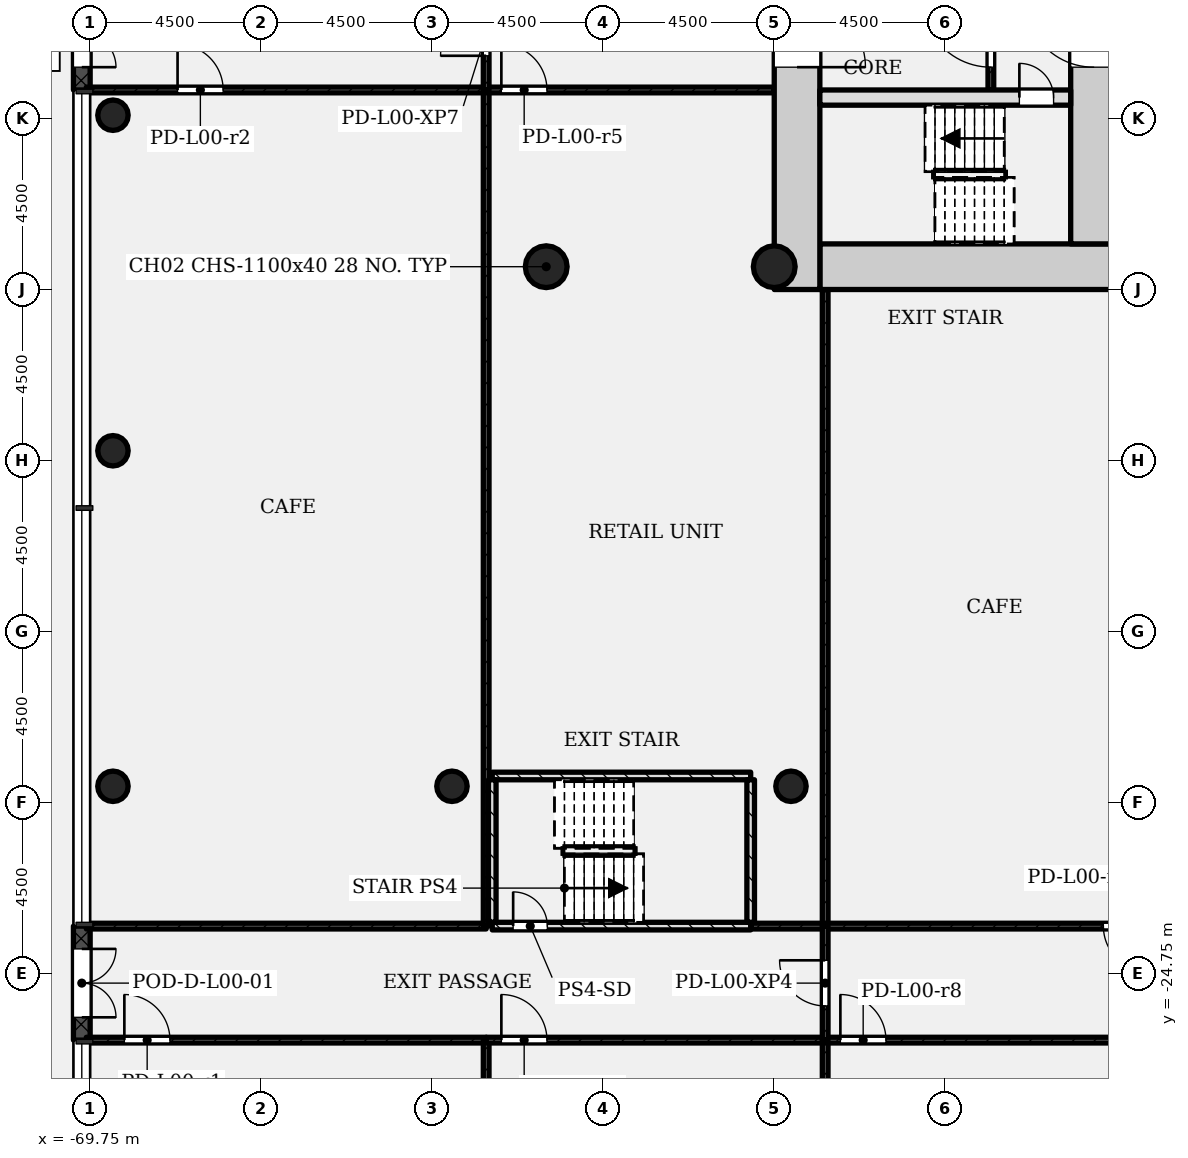
"""IFC4 building model, lengths in metres.
Left out: names, types, materials, properties, quantities, classifications, styles, units other than length and angle.
Written with IfcOpenShell. Run it as: python <this file> out.ifc"""

import sys

from ifc_helpers import new_model, si_unit, direction, frame, frame_2d, origin, origin_2d, place, context, subcontext, project, spatial, rectangle, hollow_circle, extrude, element, fill, save


model = new_model("IFC4")
c1 = context("Model", 3, precision=1e-05, world=origin(), true_north=direction((0.0, 1.0)))
c2 = subcontext(c1, "Body", "Model", "MODEL_VIEW")
j1 = project(units=[si_unit("LENGTHUNIT", "METRE"), si_unit("PLANEANGLEUNIT", "RADIAN")], contexts=[c1])
p1 = place(None, origin())
s1 = spatial("IfcSite", under=j1, at=p1, CompositionType="ELEMENT")
p2 = place(p1, origin())
s2 = spatial("IfcBuilding", under=s1, at=p2, CompositionType="ELEMENT")
p3 = place(p2, origin())
s3 = spatial("IfcBuildingStorey", under=s2, at=p3, CompositionType="ELEMENT", Elevation=0.0)
p4 = place(p3, frame((-50.55, -6.15, -0.4), z_axis=(0.0, 0.0, 1.0), x_axis=(1.0, 0.0, 0.0)))
e1 = element("IfcWall", 1, at=p4, inside=s3, PredefinedType="SHEAR", context=c2, shape_type="SweptSolid", body=[
    extrude(rectangle(XDim=7.8, YDim=1.2, at=frame_2d((3.9, 0.0))), origin(), (0.0, 0.0, 1.0), 6.4),
])
p5 = place(p3, frame((-43.35, -5.55, -0.4), z_axis=(0.0, 0.0, 1.0), x_axis=(0.0, 1.0, 0.0)))
e2 = element("IfcWall", 2, at=p5, inside=s3, PredefinedType="SHEAR", context=c2, shape_type="SweptSolid", body=[
    extrude(rectangle(XDim=12.3, YDim=1.2, at=frame_2d((6.15, 0.0))), origin(), (0.0, 0.0, 1.0), 6.4),
])
p6 = place(p5, frame((4.65, 0.0, 0.4)))
e3 = element("IfcOpeningElement", 3, at=p6, cuts=e2, PredefinedType="OPENING", context=c2, shape_type="SweptSolid", body=[
    extrude(rectangle(XDim=1.8, YDim=2.1, at=frame_2d((0.9, 1.05))), frame((0.0, 0.61, 0.0), z_axis=(0.0, -1.0, 0.0), x_axis=(1.0, 0.0, 0.0)), (0.0, 0.0, 1.0), 1.22),
])
p7 = place(p3, frame((-51.15, 5.55, -0.4), z_axis=(0.0, 0.0, 1.0), x_axis=(0.0, -1.0, 0.0)))
e4 = element("IfcWall", 4, at=p7, inside=s3, PredefinedType="SHEAR", context=c2, shape_type="SweptSolid", body=[
    extrude(rectangle(XDim=12.3, YDim=1.2, at=frame_2d((6.15, 0.0))), origin(), (0.0, 0.0, 1.0), 6.4),
])
p8 = place(p7, frame((4.65, 0.0, 0.4)))
e5 = element("IfcOpeningElement", 5, at=p8, cuts=e4, PredefinedType="OPENING", context=c2, shape_type="SweptSolid", body=[
    extrude(rectangle(XDim=1.8, YDim=2.1, at=frame_2d((0.9, 1.05))), frame((0.0, 0.61, 0.0), z_axis=(0.0, -1.0, 0.0), x_axis=(1.0, 0.0, 0.0)), (0.0, 0.0, 1.0), 1.22),
])
p9 = place(p3, frame((-50.55, -1.7, -0.4), z_axis=(0.0, 0.0, 1.0), x_axis=(1.0, 0.0, 0.0)))
e6 = element("IfcWall", 6, at=p9, inside=s3, PredefinedType="SHEAR", context=c2, shape_type="SweptSolid", body=[
    extrude(rectangle(XDim=6.6, YDim=0.4, at=frame_2d((3.3, 0.0))), origin(), (0.0, 0.0, 1.0), 6.4),
])
p10 = place(p9, frame((5.25, 0.0, 0.4)))
e7 = element("IfcOpeningElement", 7, at=p10, cuts=e6, PredefinedType="OPENING", context=c2, shape_type="SweptSolid", body=[
    extrude(rectangle(XDim=0.9, YDim=2.1, at=frame_2d((0.45, 1.05))), frame((0.0, 0.21, 0.0), z_axis=(0.0, -1.0, 0.0), x_axis=(1.0, 0.0, 0.0)), (0.0, 0.0, 1.0), 0.42),
])
for number, where, z_axis, x_axis in (
    (8, (-51.75, -6.15, -0.4), (0.0, 0.0, 1.0), (1.0, 0.0, 0.0)),
    (9, (-57.75, -6.15, -0.4), (0.0, 0.0, 1.0), (1.0, 0.0, 0.0)),
):
    element("IfcColumn", number, at=place(p3, frame(where, z_axis=z_axis, x_axis=x_axis)), inside=s3, PredefinedType="COLUMN", context=c2, shape_type="SweptSolid", body=[
        extrude(hollow_circle(Radius=0.55, WallThickness=0.04, at=origin_2d()), origin(), (0.0, 0.0, 1.0), 6.4),
    ])
for number, where, z_axis, x_axis in (
    (10, (-69.15, -19.821, -0.4), (0.0, 0.0, 1.0), (1.0, 0.0, 0.0)),
    (11, (-60.23, -19.821, -0.4), (0.0, 0.0, 1.0), (1.0, 0.0, 0.0)),
    (12, (-51.31, -19.821, -0.4), (0.0, 0.0, 1.0), (1.0, 0.0, 0.0)),
    (13, (-69.15, -10.993, -0.4), (0.0, 0.0, 1.0), (1.0, 0.0, 0.0)),
    (14, (-69.15, -2.164, -0.4), (0.0, 0.0, 1.0), (1.0, 0.0, 0.0)),
):
    element("IfcColumn", number, at=place(p3, frame(where, z_axis=z_axis, x_axis=x_axis)), inside=s3, PredefinedType="COLUMN", context=c2, shape_type="SweptSolid", body=[
        extrude(hollow_circle(Radius=0.4, WallThickness=0.028, at=origin_2d()), origin(), (0.0, 0.0, 1.0), 6.4),
    ])
p11 = place(p3, frame((-69.97, 1.5, 0.0), z_axis=(0.0, 0.0, 1.0), x_axis=(0.0, -1.0, 0.0)))
e15 = element("IfcWall", 15, at=p11, inside=s3, PredefinedType="STANDARD", context=c2, shape_type="SweptSolid", body=[
    extrude(rectangle(XDim=3.0, YDim=0.44, at=frame_2d((1.5, 0.0))), origin(), (0.0, 0.0, 1.0), 5.7),
])
p12 = place(p11, frame((0.6, 0.0, 0.0)))
e16 = element("IfcOpeningElement", 16, at=p12, cuts=e15, PredefinedType="OPENING", context=c2, shape_type="SweptSolid", body=[
    extrude(rectangle(XDim=1.8, YDim=2.1, at=frame_2d((0.9, 1.05))), frame((0.0, 0.23, 0.0), z_axis=(0.0, -1.0, 0.0), x_axis=(1.0, 0.0, 0.0)), (0.0, 0.0, 1.0), 0.46),
])
p13 = place(p3, frame((-69.97, -23.5, 0.0), z_axis=(0.0, 0.0, 1.0), x_axis=(0.0, -1.0, 0.0)))
e17 = element("IfcWall", 17, at=p13, inside=s3, PredefinedType="STANDARD", context=c2, shape_type="SweptSolid", body=[
    extrude(rectangle(XDim=3.0, YDim=0.44, at=frame_2d((1.5, 0.0))), origin(), (0.0, 0.0, 1.0), 5.7),
])
p14 = place(p13, frame((0.6, 0.0, 0.0)))
e18 = element("IfcOpeningElement", 18, at=p14, cuts=e17, PredefinedType="OPENING", context=c2, shape_type="SweptSolid", body=[
    extrude(rectangle(XDim=1.8, YDim=2.1, at=frame_2d((0.9, 1.05))), frame((0.0, 0.23, 0.0), z_axis=(0.0, -1.0, 0.0), x_axis=(1.0, 0.0, 0.0)), (0.0, 0.0, 1.0), 0.46),
])
p15 = place(p3, frame((-46.05, 1.5, 0.0), z_axis=(0.0, 0.0, 1.0), x_axis=(0.0, -1.0, 0.0)))
e19 = element("IfcWall", 19, at=p15, inside=s3, PredefinedType="PARTITIONING", context=c2, shape_type="SweptSolid", body=[
    extrude(rectangle(XDim=3.0, YDim=0.15, at=frame_2d((1.5, 0.0))), origin(), (0.0, 0.0, 1.0), 5.58),
])
p16 = place(p15, frame((0.6, 0.0, 0.0)))
e20 = element("IfcOpeningElement", 20, at=p16, cuts=e19, PredefinedType="OPENING", context=c2, shape_type="SweptSolid", body=[
    extrude(rectangle(XDim=1.8, YDim=2.1, at=frame_2d((0.9, 1.05))), frame((0.0, 0.085, 0.0), z_axis=(0.0, -1.0, 0.0), x_axis=(1.0, 0.0, 0.0)), (0.0, 0.0, 1.0), 0.17),
])
p17 = place(p3, frame((-69.85, -26.5, 0.0), z_axis=(0.0, 0.0, 1.0), x_axis=(1.0, 0.0, 0.0)))
e21 = element("IfcWall", 21, at=p17, inside=s3, PredefinedType="PARTITIONING", context=c2, shape_type="SweptSolid", body=[
    extrude(rectangle(XDim=10.52, YDim=0.15, at=frame_2d((5.26, 0.0))), origin(), (0.0, 0.0, 1.0), 5.58),
])
p18 = place(p17, frame((1.0, 0.0, 0.0)))
e22 = element("IfcOpeningElement", 22, at=p18, cuts=e21, PredefinedType="OPENING", context=c2, shape_type="SweptSolid", body=[
    extrude(rectangle(XDim=1.2, YDim=2.1, at=frame_2d((0.6, 1.05))), frame((0.0, 0.085, 0.0), z_axis=(0.0, -1.0, 0.0), x_axis=(1.0, 0.0, 0.0)), (0.0, 0.0, 1.0), 0.17),
])
p19 = place(p3, frame((-59.33, -26.5, 0.0), z_axis=(0.0, 0.0, 1.0), x_axis=(0.0, -1.0, 0.0)))
e23 = element("IfcWall", 23, at=p19, inside=s3, PredefinedType="PARTITIONING", context=c2, shape_type="SweptSolid", body=[
    extrude(rectangle(XDim=16.35, YDim=0.15, at=frame_2d((8.175, 0.0))), origin(), (0.0, 0.0, 1.0), 5.58),
])
p20 = place(p3, frame((-69.85, -1.5, 0.0), z_axis=(0.0, 0.0, 1.0), x_axis=(1.0, 0.0, 0.0)))
e24 = element("IfcWall", 24, at=p20, inside=s3, PredefinedType="PARTITIONING", context=c2, shape_type="SweptSolid", body=[
    extrude(rectangle(XDim=10.52, YDim=0.15, at=frame_2d((5.26, 0.0))), origin(), (0.0, 0.0, 1.0), 5.58),
])
p21 = place(p20, frame((2.4, 0.0, 0.0)))
e25 = element("IfcOpeningElement", 25, at=p21, cuts=e24, PredefinedType="OPENING", context=c2, shape_type="SweptSolid", body=[
    extrude(rectangle(XDim=1.2, YDim=2.1, at=frame_2d((0.6, 1.05))), frame((0.0, 0.085, 0.0), z_axis=(0.0, -1.0, 0.0), x_axis=(1.0, 0.0, 0.0)), (0.0, 0.0, 1.0), 0.17),
])
p22 = place(p3, frame((-59.33, -23.5, 0.0), z_axis=(0.0, 0.0, 1.0), x_axis=(-1.0, 0.0, 0.0)))
e26 = element("IfcWall", 26, at=p22, inside=s3, PredefinedType="PARTITIONING", context=c2, shape_type="SweptSolid", body=[
    extrude(rectangle(XDim=10.52, YDim=0.15, at=frame_2d((5.26, 0.0))), origin(), (0.0, 0.0, 1.0), 5.58),
])
p23 = place(p3, frame((-59.33, -1.5, 0.0), z_axis=(0.0, 0.0, 1.0), x_axis=(0.0, -1.0, 0.0)))
e27 = element("IfcWall", 27, at=p23, inside=s3, PredefinedType="PARTITIONING", context=c2, shape_type="SweptSolid", body=[
    extrude(rectangle(XDim=22.0, YDim=0.15, at=frame_2d((11.0, 0.0))), origin(), (0.0, 0.0, 1.0), 5.58),
])
p24 = place(p3, frame((-59.33, -26.5, 0.0), z_axis=(0.0, 0.0, 1.0), x_axis=(1.0, 0.0, 0.0)))
e28 = element("IfcWall", 28, at=p24, inside=s3, PredefinedType="PARTITIONING", context=c2, shape_type="SweptSolid", body=[
    extrude(rectangle(XDim=8.92, YDim=0.15, at=frame_2d((4.46, 0.0))), origin(), (0.0, 0.0, 1.0), 5.58),
])
p25 = place(p24, frame((0.4, 0.0, 0.0)))
e29 = element("IfcOpeningElement", 29, at=p25, cuts=e28, PredefinedType="OPENING", context=c2, shape_type="SweptSolid", body=[
    extrude(rectangle(XDim=1.2, YDim=2.1, at=frame_2d((0.6, 1.05))), frame((0.0, 0.085, 0.0), z_axis=(0.0, -1.0, 0.0), x_axis=(1.0, 0.0, 0.0)), (0.0, 0.0, 1.0), 0.17),
])
p26 = place(p3, frame((-50.41, -26.5, 0.0), z_axis=(0.0, 0.0, 1.0), x_axis=(0.0, -1.0, 0.0)))
e30 = element("IfcWall", 30, at=p26, inside=s3, PredefinedType="PARTITIONING", context=c2, shape_type="SweptSolid", body=[
    extrude(rectangle(XDim=16.35, YDim=0.15, at=frame_2d((8.175, 0.0))), origin(), (0.0, 0.0, 1.0), 5.58),
])
p27 = place(p3, frame((-59.33, -1.5, 0.0), z_axis=(0.0, 0.0, 1.0), x_axis=(1.0, 0.0, 0.0)))
e31 = element("IfcWall", 31, at=p27, inside=s3, PredefinedType="PARTITIONING", context=c2, shape_type="SweptSolid", body=[
    extrude(rectangle(XDim=7.58, YDim=0.15, at=frame_2d((3.79, 0.0))), origin(), (0.0, 0.0, 1.0), 5.58),
])
p28 = place(p27, frame((0.4, 0.0, 0.0)))
e32 = element("IfcOpeningElement", 32, at=p28, cuts=e31, PredefinedType="OPENING", context=c2, shape_type="SweptSolid", body=[
    extrude(rectangle(XDim=1.2, YDim=2.1, at=frame_2d((0.6, 1.05))), frame((0.0, 0.085, 0.0), z_axis=(0.0, -1.0, 0.0), x_axis=(1.0, 0.0, 0.0)), (0.0, 0.0, 1.0), 0.17),
])
p29 = place(p3, frame((-50.41, -23.5, 0.0), z_axis=(0.0, 0.0, 1.0), x_axis=(-1.0, 0.0, 0.0)))
e33 = element("IfcWall", 33, at=p29, inside=s3, PredefinedType="PARTITIONING", context=c2, shape_type="SweptSolid", body=[
    extrude(rectangle(XDim=1.96, YDim=0.15, at=frame_2d((0.98, 0.0))), origin(), (0.0, 0.0, 1.0), 5.58),
])
p30 = place(p3, frame((-50.41, -6.75, 0.0), z_axis=(0.0, 0.0, 1.0), x_axis=(0.0, -1.0, 0.0)))
e34 = element("IfcWall", 34, at=p30, inside=s3, PredefinedType="PARTITIONING", context=c2, shape_type="SweptSolid", body=[
    extrude(rectangle(XDim=16.75, YDim=0.15, at=frame_2d((8.375, 0.0))), origin(), (0.0, 0.0, 1.0), 5.58),
])
p31 = place(p3, frame((-50.41, -26.5, 0.0), z_axis=(0.0, 0.0, 1.0), x_axis=(1.0, 0.0, 0.0)))
e35 = element("IfcWall", 35, at=p31, inside=s3, PredefinedType="PARTITIONING", context=c2, shape_type="SweptSolid", body=[
    extrude(rectangle(XDim=8.92, YDim=0.15, at=frame_2d((4.46, 0.0))), origin(), (0.0, 0.0, 1.0), 5.58),
])
p32 = place(p31, frame((0.4, 0.0, 0.0)))
e36 = element("IfcOpeningElement", 36, at=p32, cuts=e35, PredefinedType="OPENING", context=c2, shape_type="SweptSolid", body=[
    extrude(rectangle(XDim=1.2, YDim=2.1, at=frame_2d((0.6, 1.05))), frame((0.0, 0.085, 0.0), z_axis=(0.0, -1.0, 0.0), x_axis=(1.0, 0.0, 0.0)), (0.0, 0.0, 1.0), 0.17),
])
p33 = place(p3, frame((-41.49, -23.5, 0.0), z_axis=(0.0, 0.0, 1.0), x_axis=(-1.0, 0.0, 0.0)))
e37 = element("IfcWall", 37, at=p33, inside=s3, PredefinedType="PARTITIONING", context=c2, shape_type="SweptSolid", body=[
    extrude(rectangle(XDim=8.92, YDim=0.15, at=frame_2d((4.46, 0.0))), origin(), (0.0, 0.0, 1.0), 5.58),
])
p34 = place(p33, frame((0.4, 0.0, 0.0)))
e38 = element("IfcOpeningElement", 38, at=p34, cuts=e37, PredefinedType="OPENING", context=c2, shape_type="SweptSolid", body=[
    extrude(rectangle(XDim=1.2, YDim=2.1, at=frame_2d((0.6, 1.05))), frame((0.0, 0.085, 0.0), z_axis=(0.0, -1.0, 0.0), x_axis=(1.0, 0.0, 0.0)), (0.0, 0.0, 1.0), 0.17),
])
p35 = place(p3, frame((-50.41, -26.5, 0.0), z_axis=(0.0, 0.0, 1.0), x_axis=(0.0, 1.0, 0.0)))
e39 = element("IfcWall", 39, at=p35, inside=s3, PredefinedType="PARTITIONING", context=c2, shape_type="SweptSolid", body=[
    extrude(rectangle(XDim=3.0, YDim=0.15, at=frame_2d((1.5, 0.0))), origin(), (0.0, 0.0, 1.0), 5.58),
])
p36 = place(p35, frame((0.9, 0.0, 0.0)))
e40 = element("IfcOpeningElement", 40, at=p36, cuts=e39, PredefinedType="OPENING", context=c2, shape_type="SweptSolid", body=[
    extrude(rectangle(XDim=1.2, YDim=2.1, at=frame_2d((0.6, 1.05))), frame((0.0, 0.085, 0.0), z_axis=(0.0, -1.0, 0.0), x_axis=(1.0, 0.0, 0.0)), (0.0, 0.0, 1.0), 0.17),
])
p37 = place(p3, frame((-59.33, -1.5, 0.0), z_axis=(0.0, 0.0, 1.0), x_axis=(0.0, 1.0, 0.0)))
e41 = element("IfcWall", 41, at=p37, inside=s3, PredefinedType="PARTITIONING", context=c2, shape_type="SweptSolid", body=[
    extrude(rectangle(XDim=3.0, YDim=0.15, at=frame_2d((1.5, 0.0))), origin(), (0.0, 0.0, 1.0), 5.58),
])
p38 = place(p37, frame((0.9, 0.0, 0.0)))
e42 = element("IfcOpeningElement", 42, at=p38, cuts=e41, PredefinedType="OPENING", context=c2, shape_type="SweptSolid", body=[
    extrude(rectangle(XDim=1.2, YDim=2.1, at=frame_2d((0.6, 1.05))), frame((0.0, 0.085, 0.0), z_axis=(0.0, -1.0, 0.0), x_axis=(1.0, 0.0, 0.0)), (0.0, 0.0, 1.0), 0.17),
])
p39 = place(p3, frame((-59.17, -23.5, 0.0), z_axis=(0.0, 0.0, 1.0), x_axis=(1.0, 0.0, 0.0)))
e43 = element("IfcWall", 43, at=p39, inside=s3, PredefinedType="SHEAR", context=c2, shape_type="SweptSolid", body=[
    extrude(rectangle(XDim=6.8, YDim=0.2, at=frame_2d((3.4, 0.0))), origin(), (0.0, 0.0, 1.0), 5.58),
])
p40 = place(p39, frame((0.55, 0.0, 0.0)))
e44 = element("IfcOpeningElement", 44, at=p40, cuts=e43, PredefinedType="OPENING", context=c2, shape_type="SweptSolid", body=[
    extrude(rectangle(XDim=0.9, YDim=2.1, at=frame_2d((0.45, 1.05))), frame((0.0, 0.11, 0.0), z_axis=(0.0, -1.0, 0.0), x_axis=(1.0, 0.0, 0.0)), (0.0, 0.0, 1.0), 0.22),
])
p41 = place(p3, frame((-59.17, -19.55, 0.0), z_axis=(0.0, 0.0, 1.0), x_axis=(1.0, 0.0, 0.0)))
e45 = element("IfcWall", 45, at=p41, inside=s3, PredefinedType="SHEAR", context=c2, shape_type="SweptSolid", body=[
    extrude(rectangle(XDim=6.8, YDim=0.2, at=frame_2d((3.4, 0.0))), origin(), (0.0, 0.0, 1.0), 5.58),
])
for number, where, z_axis, x_axis in (
    (46, (-59.17, -23.4, 0.0), (0.0, 0.0, 1.0), (0.0, 1.0, 0.0)),
    (47, (-52.37, -23.4, 0.0), (0.0, 0.0, 1.0), (0.0, 1.0, 0.0)),
):
    element("IfcWall", number, at=place(p3, frame(where, z_axis=z_axis, x_axis=x_axis)), inside=s3, PredefinedType="SHEAR", context=c2, shape_type="SweptSolid", body=[
        extrude(rectangle(XDim=3.75, YDim=0.2, at=frame_2d((1.875, 0.0))), origin(), (0.0, 0.0, 1.0), 5.58),
    ])
p42 = place(p12, origin())
e48 = element("IfcDoor", 48, at=p42, inside=s3, OperationType="DOUBLE_DOOR_DOUBLE_SWING", PredefinedType="DOOR", context=c2, shape_type="SweptSolid", body=[
    extrude(rectangle(XDim=1.8, YDim=2.1, at=frame_2d((0.9, 1.05))), frame((0.0, 0.025, 0.0), z_axis=(0.0, -1.0, 0.0), x_axis=(1.0, 0.0, 0.0)), (0.0, 0.0, 1.0), 0.05),
])
fill(e16, e48)
p43 = place(p14, origin())
e49 = element("IfcDoor", 49, at=p43, inside=s3, OperationType="DOUBLE_DOOR_DOUBLE_SWING", PredefinedType="DOOR", context=c2, shape_type="SweptSolid", body=[
    extrude(rectangle(XDim=1.8, YDim=2.1, at=frame_2d((0.9, 1.05))), frame((0.0, 0.025, 0.0), z_axis=(0.0, -1.0, 0.0), x_axis=(1.0, 0.0, 0.0)), (0.0, 0.0, 1.0), 0.05),
])
fill(e18, e49)
p44 = place(p16, origin())
e50 = element("IfcDoor", 50, at=p44, inside=s3, OperationType="SINGLE_SWING_LEFT", PredefinedType="DOOR", context=c2, shape_type="SweptSolid", body=[
    extrude(rectangle(XDim=1.8, YDim=2.1, at=frame_2d((0.9, 1.05))), frame((0.0, 0.025, 0.0), z_axis=(0.0, -1.0, 0.0), x_axis=(1.0, 0.0, 0.0)), (0.0, 0.0, 1.0), 0.05),
])
fill(e20, e50)
p45 = place(p18, origin())
e51 = element("IfcDoor", 51, at=p45, inside=s3, OperationType="SINGLE_SWING_RIGHT", PredefinedType="DOOR", context=c2, shape_type="SweptSolid", body=[
    extrude(rectangle(XDim=1.2, YDim=2.1, at=frame_2d((0.6, 1.05))), frame((0.0, 0.025, 0.0), z_axis=(0.0, -1.0, 0.0), x_axis=(1.0, 0.0, 0.0)), (0.0, 0.0, 1.0), 0.05),
])
fill(e22, e51)
p46 = place(p21, origin())
e52 = element("IfcDoor", 52, at=p46, inside=s3, OperationType="SINGLE_SWING_RIGHT", PredefinedType="DOOR", context=c2, shape_type="SweptSolid", body=[
    extrude(rectangle(XDim=1.2, YDim=2.1, at=frame_2d((0.6, 1.05))), frame((0.0, 0.025, 0.0), z_axis=(0.0, -1.0, 0.0), x_axis=(1.0, 0.0, 0.0)), (0.0, 0.0, 1.0), 0.05),
])
fill(e25, e52)
p47 = place(p25, origin())
e53 = element("IfcDoor", 53, at=p47, inside=s3, OperationType="SINGLE_SWING_RIGHT", PredefinedType="DOOR", context=c2, shape_type="SweptSolid", body=[
    extrude(rectangle(XDim=1.2, YDim=2.1, at=frame_2d((0.6, 1.05))), frame((0.0, 0.025, 0.0), z_axis=(0.0, -1.0, 0.0), x_axis=(1.0, 0.0, 0.0)), (0.0, 0.0, 1.0), 0.05),
])
fill(e29, e53)
p48 = place(p28, origin())
e54 = element("IfcDoor", 54, at=p48, inside=s3, OperationType="SINGLE_SWING_RIGHT", PredefinedType="DOOR", context=c2, shape_type="SweptSolid", body=[
    extrude(rectangle(XDim=1.2, YDim=2.1, at=frame_2d((0.6, 1.05))), frame((0.0, 0.025, 0.0), z_axis=(0.0, -1.0, 0.0), x_axis=(1.0, 0.0, 0.0)), (0.0, 0.0, 1.0), 0.05),
])
fill(e32, e54)
p49 = place(p32, origin())
e55 = element("IfcDoor", 55, at=p49, inside=s3, OperationType="SINGLE_SWING_RIGHT", PredefinedType="DOOR", context=c2, shape_type="SweptSolid", body=[
    extrude(rectangle(XDim=1.2, YDim=2.1, at=frame_2d((0.6, 1.05))), frame((0.0, 0.025, 0.0), z_axis=(0.0, -1.0, 0.0), x_axis=(1.0, 0.0, 0.0)), (0.0, 0.0, 1.0), 0.05),
])
fill(e36, e55)
p50 = place(p34, origin())
e56 = element("IfcDoor", 56, at=p50, inside=s3, OperationType="SINGLE_SWING_RIGHT", PredefinedType="DOOR", context=c2, shape_type="SweptSolid", body=[
    extrude(rectangle(XDim=1.2, YDim=2.1, at=frame_2d((0.6, 1.05))), frame((0.0, 0.025, 0.0), z_axis=(0.0, -1.0, 0.0), x_axis=(1.0, 0.0, 0.0)), (0.0, 0.0, 1.0), 0.05),
])
fill(e38, e56)
p51 = place(p36, origin())
e57 = element("IfcDoor", 57, at=p51, inside=s3, OperationType="SINGLE_SWING_LEFT", PredefinedType="DOOR", context=c2, shape_type="SweptSolid", body=[
    extrude(rectangle(XDim=1.2, YDim=2.1, at=frame_2d((0.6, 1.05))), frame((0.0, 0.025, 0.0), z_axis=(0.0, -1.0, 0.0), x_axis=(1.0, 0.0, 0.0)), (0.0, 0.0, 1.0), 0.05),
])
fill(e40, e57)
p52 = place(p38, origin())
e58 = element("IfcDoor", 58, at=p52, inside=s3, OperationType="SINGLE_SWING_RIGHT", PredefinedType="DOOR", context=c2, shape_type="SweptSolid", body=[
    extrude(rectangle(XDim=1.2, YDim=2.1, at=frame_2d((0.6, 1.05))), frame((0.0, 0.025, 0.0), z_axis=(0.0, -1.0, 0.0), x_axis=(1.0, 0.0, 0.0)), (0.0, 0.0, 1.0), 0.05),
])
fill(e42, e58)
p53 = place(p40, origin())
e59 = element("IfcDoor", 59, at=p53, inside=s3, OperationType="SINGLE_SWING_RIGHT", PredefinedType="DOOR", context=c2, shape_type="SweptSolid", body=[
    extrude(rectangle(XDim=0.9, YDim=2.1, at=frame_2d((0.45, 1.05))), frame((0.0, 0.025, 0.0), z_axis=(0.0, -1.0, 0.0), x_axis=(1.0, 0.0, 0.0)), (0.0, 0.0, 1.0), 0.05),
])
fill(e44, e59)
p54 = place(p10, origin())
e60 = element("IfcDoor", 60, at=p54, inside=s3, OperationType="SINGLE_SWING_RIGHT", PredefinedType="DOOR", context=c2, shape_type="SweptSolid", body=[
    extrude(rectangle(XDim=0.9, YDim=2.1, at=frame_2d((0.45, 1.05))), frame((0.0, 0.025, 0.0), z_axis=(0.0, -1.0, 0.0), x_axis=(1.0, 0.0, 0.0)), (0.0, 0.0, 1.0), 0.05),
])
fill(e7, e60)
p55 = place(p6, origin())
e61 = element("IfcDoor", 61, at=p55, inside=s3, OperationType="SINGLE_SWING_LEFT", PredefinedType="DOOR", context=c2, shape_type="SweptSolid", body=[
    extrude(rectangle(XDim=1.8, YDim=2.1, at=frame_2d((0.9, 1.05))), frame((0.0, 0.025, 0.0), z_axis=(0.0, -1.0, 0.0), x_axis=(1.0, 0.0, 0.0)), (0.0, 0.0, 1.0), 0.05),
])
fill(e3, e61)
p56 = place(p8, origin())
e62 = element("IfcDoor", 62, at=p56, inside=s3, OperationType="SINGLE_SWING_LEFT", PredefinedType="DOOR", context=c2, shape_type="SweptSolid", body=[
    extrude(rectangle(XDim=1.8, YDim=2.1, at=frame_2d((0.9, 1.05))), frame((0.0, 0.025, 0.0), z_axis=(0.0, -1.0, 0.0), x_axis=(1.0, 0.0, 0.0)), (0.0, 0.0, 1.0), 0.05),
])
fill(e5, e62)
save(model, sys.argv[1])
